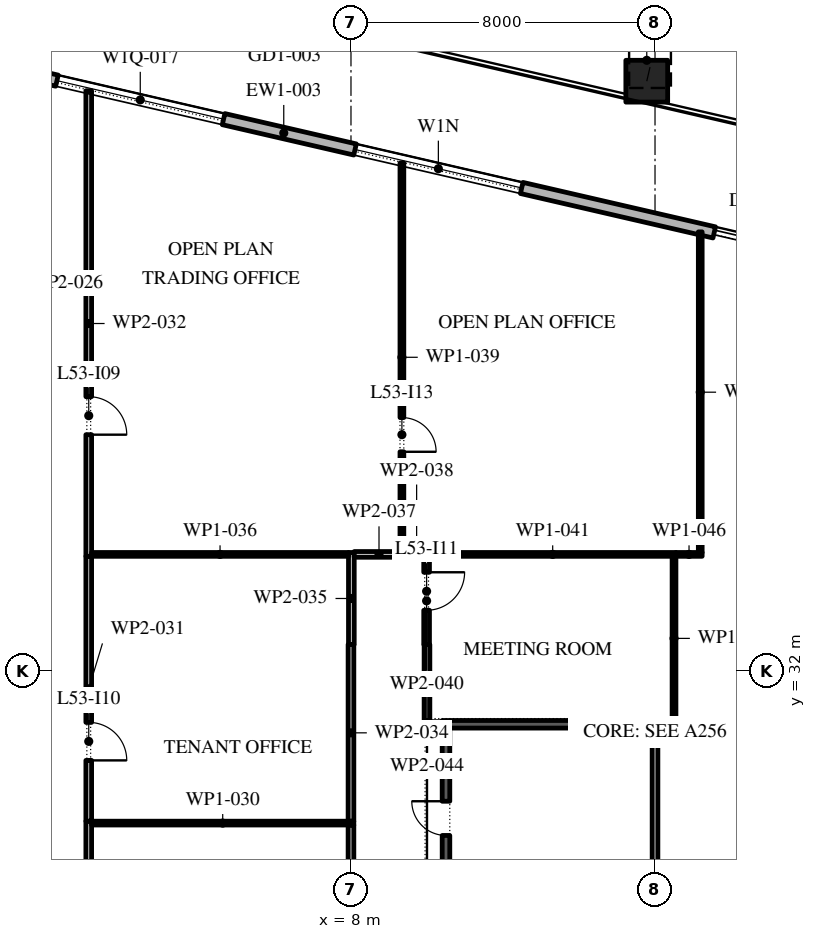
"""IFC4 building model, lengths in metres.
Left out: names, types, materials, properties, quantities, classifications, styles, units other than length and angle.
Written with IfcOpenShell. Run it as: python <this file> out.ifc"""

import sys

from ifc_helpers import new_model, si_unit, direction, frame, frame_2d, origin, origin_2d, place, context, subcontext, project, spatial, rectangle, extrude, element, fill, save


model = new_model("IFC4")
c1 = context("Model", 3, precision=1e-05, world=origin(), true_north=direction((0.0, 1.0)))
c2 = subcontext(c1, "Body", "Model", "MODEL_VIEW")
j1 = project(units=[si_unit("LENGTHUNIT", "METRE"), si_unit("PLANEANGLEUNIT", "RADIAN")], contexts=[c1])
p1 = place(None, origin())
s1 = spatial("IfcSite", under=j1, at=p1, CompositionType="ELEMENT")
p2 = place(p1, origin())
s2 = spatial("IfcBuilding", under=s1, at=p2, CompositionType="ELEMENT")
p3 = place(p2, frame((0.0, 0.0, 247.2)))
s3 = spatial("IfcBuildingStorey", under=s2, at=p3, CompositionType="ELEMENT", Elevation=247.2)
p4 = place(p3, frame((15.783, 47.521, 0.0), z_axis=(0.020377493232, 0.0882252832, 0.995892091129), x_axis=(-0.97434807649, 0.225046274885, 0.0)))
e1 = element("IfcColumn", 1, at=p4, inside=s3, PredefinedType="COLUMN", context=c2, shape_type="SweptSolid", body=[
    extrude(rectangle(XDim=1.1, YDim=1.1, at=origin_2d()), origin(), (0.0, 0.0, 1.0), 4.217),
])
p5 = place(p3, frame((29.616, 40.758, 0.0), z_axis=(0.0, 0.0, 1.0), x_axis=(-0.974370532314, 0.224949029246, 0.0)))
e2 = element("IfcWall", 2, at=p5, inside=s3, PredefinedType="STANDARD", context=c2, shape_type="SweptSolid", body=[
    extrude(rectangle(XDim=48.0, YDim=0.3, at=frame_2d((24.0, 0.0))), origin(), (0.0, 0.0, 1.0), 4.0),
])
p6 = place(p5, frame((1.625, 0.0, 0.45)))
e3 = element("IfcOpeningElement", 3, at=p6, cuts=e2, PredefinedType="OPENING", context=c2, shape_type="SweptSolid", body=[
    extrude(rectangle(XDim=4.5, YDim=2.675, at=frame_2d((2.25, 1.337))), frame((0.0, 0.16, 0.0), z_axis=(0.0, -1.0, 0.0), x_axis=(1.0, 0.0, 0.0)), (0.0, 0.0, 1.0), 0.32),
])
p7 = place(p5, frame((9.975, 0.0, 0.0)))
e4 = element("IfcOpeningElement", 4, at=p7, cuts=e2, PredefinedType="OPENING", context=c2, shape_type="SweptSolid", body=[
    extrude(rectangle(XDim=2.4, YDim=3.5, at=frame_2d((1.2, 1.75))), frame((0.0, 0.16, 0.0), z_axis=(0.0, -1.0, 0.0), x_axis=(1.0, 0.0, 0.0)), (0.0, 0.0, 1.0), 0.32),
])
p8 = place(p5, frame((17.575, 0.0, 0.45)))
e5 = element("IfcOpeningElement", 5, at=p8, cuts=e2, PredefinedType="OPENING", context=c2, shape_type="SweptSolid", body=[
    extrude(rectangle(XDim=4.5, YDim=2.525, at=frame_2d((2.25, 1.262))), frame((0.0, 0.16, 0.0), z_axis=(0.0, -1.0, 0.0), x_axis=(1.0, 0.0, 0.0)), (0.0, 0.0, 1.0), 0.32),
])
p9 = place(p5, frame((25.625, 0.0, 0.45)))
e6 = element("IfcOpeningElement", 6, at=p9, cuts=e2, PredefinedType="OPENING", context=c2, shape_type="SweptSolid", body=[
    extrude(rectangle(XDim=4.5, YDim=2.45, at=frame_2d((2.25, 1.225))), frame((0.0, 0.16, 0.0), z_axis=(0.0, -1.0, 0.0), x_axis=(1.0, 0.0, 0.0)), (0.0, 0.0, 1.0), 0.32),
])
p10 = place(p5, frame((33.675, 0.0, 0.45)))
e7 = element("IfcOpeningElement", 7, at=p10, cuts=e2, PredefinedType="OPENING", context=c2, shape_type="SweptSolid", body=[
    extrude(rectangle(XDim=4.5, YDim=2.45, at=frame_2d((2.25, 1.225))), frame((0.0, 0.16, 0.0), z_axis=(0.0, -1.0, 0.0), x_axis=(1.0, 0.0, 0.0)), (0.0, 0.0, 1.0), 0.32),
])
p11 = place(p5, frame((42.775, 0.0, 0.0)))
e8 = element("IfcOpeningElement", 8, at=p11, cuts=e2, PredefinedType="OPENING", context=c2, shape_type="SweptSolid", body=[
    extrude(rectangle(XDim=2.4, YDim=3.5, at=frame_2d((1.2, 1.75))), frame((0.0, 0.16, 0.0), z_axis=(0.0, -1.0, 0.0), x_axis=(1.0, 0.0, 0.0)), (0.0, 0.0, 1.0), 0.32),
])
p12 = place(p3, frame((10.5, 25.75, 0.0), z_axis=(0.0, 0.0, 1.0), x_axis=(0.0, 1.0, 0.0)))
e9 = element("IfcWall", 9, at=p12, inside=s3, PredefinedType="SHEAR", context=c2, shape_type="SweptSolid", body=[
    extrude(rectangle(XDim=4.75, YDim=0.2, at=frame_2d((2.375, 0.0))), origin(), (0.0, 0.0, 1.0), 4.0),
])
p13 = place(p12, frame((1.925, 0.0, 0.0)))
e10 = element("IfcOpeningElement", 10, at=p13, cuts=e9, PredefinedType="OPENING", context=c2, shape_type="SweptSolid", body=[
    extrude(rectangle(XDim=0.9, YDim=2.1, at=frame_2d((0.45, 1.05))), frame((0.0, 0.11, 0.0), z_axis=(0.0, -1.0, 0.0), x_axis=(1.0, 0.0, 0.0)), (0.0, 0.0, 1.0), 0.22),
])
p14 = place(p3, frame((10.4, 30.6, 0.0), z_axis=(0.0, 0.0, 1.0), x_axis=(1.0, 0.0, 0.0)))
e11 = element("IfcWall", 11, at=p14, inside=s3, PredefinedType="SHEAR", context=c2, shape_type="SweptSolid", body=[
    extrude(rectangle(XDim=11.2, YDim=0.2, at=frame_2d((5.6, 0.0))), origin(), (0.0, 0.0, 1.0), 4.0),
])
p15 = place(p3, frame((16.0, 25.75, 0.0), z_axis=(0.0, 0.0, 1.0), x_axis=(0.0, 1.0, 0.0)))
e12 = element("IfcWall", 12, at=p15, inside=s3, PredefinedType="PARTITIONING", context=c2, shape_type="SweptSolid", body=[
    extrude(rectangle(XDim=4.75, YDim=0.15, at=frame_2d((2.375, 0.0))), origin(), (0.0, 0.0, 1.0), 4.0),
])
p16 = place(p3, frame((1.1, 28.05, 0.0), z_axis=(0.0, 0.0, 1.0), x_axis=(0.0, -1.0, 0.0)))
e13 = element("IfcWall", 13, at=p16, inside=s3, PredefinedType="PARTITIONING", context=c2, shape_type="SweptSolid", body=[
    extrude(rectangle(XDim=8.975, YDim=0.15, at=frame_2d((4.488, 0.0))), origin(), (0.0, 0.0, 1.0), 4.0),
])
p17 = place(p3, frame((1.175, 28.0, 0.0), z_axis=(0.0, 0.0, 1.0), x_axis=(1.0, 0.0, 0.0)))
e14 = element("IfcWall", 14, at=p17, inside=s3, PredefinedType="PARTITIONING", context=c2, shape_type="SweptSolid", body=[
    extrude(rectangle(XDim=6.9, YDim=0.1, at=frame_2d((3.45, 0.0))), origin(), (0.0, 0.0, 1.0), 4.0),
])
p18 = place(p3, frame((1.1, 35.02, 0.0), z_axis=(0.0, 0.0, 1.0), x_axis=(0.0, -1.0, 0.0)))
e15 = element("IfcWall", 15, at=p18, inside=s3, PredefinedType="PARTITIONING", context=c2, shape_type="SweptSolid", body=[
    extrude(rectangle(XDim=6.97, YDim=0.15, at=frame_2d((3.485, 0.0))), origin(), (0.0, 0.0, 1.0), 4.0),
])
p19 = place(p18, frame((4.37, 0.0, 0.0)))
e16 = element("IfcOpeningElement", 16, at=p19, cuts=e15, PredefinedType="OPENING", context=c2, shape_type="SweptSolid", body=[
    extrude(rectangle(XDim=1.0, YDim=2.1, at=frame_2d((0.5, 1.05))), frame((0.0, 0.085, 0.0), z_axis=(0.0, -1.0, 0.0), x_axis=(1.0, 0.0, 0.0)), (0.0, 0.0, 1.0), 0.17),
])
p20 = place(p3, frame((1.1, 47.27, 0.0), z_axis=(0.0, 0.0, 1.0), x_axis=(0.0, -1.0, 0.0)))
e17 = element("IfcWall", 17, at=p20, inside=s3, PredefinedType="PARTITIONING", context=c2, shape_type="SweptSolid", body=[
    extrude(rectangle(XDim=12.25, YDim=0.15, at=frame_2d((6.125, 0.0))), origin(), (0.0, 0.0, 1.0), 4.0),
])
p21 = place(p20, frame((8.05, 0.0, 0.0)))
e18 = element("IfcOpeningElement", 18, at=p21, cuts=e17, PredefinedType="OPENING", context=c2, shape_type="SweptSolid", body=[
    extrude(rectangle(XDim=1.0, YDim=2.1, at=frame_2d((0.5, 1.05))), frame((0.0, 0.085, 0.0), z_axis=(0.0, -1.0, 0.0), x_axis=(1.0, 0.0, 0.0)), (0.0, 0.0, 1.0), 0.17),
])
p22 = place(p3, frame((8.0, 19.075, 0.0), z_axis=(0.0, 0.0, 1.0), x_axis=(0.0, 1.0, 0.0)))
e19 = element("IfcWall", 19, at=p22, inside=s3, PredefinedType="PARTITIONING", context=c2, shape_type="SweptSolid", body=[
    extrude(rectangle(XDim=8.875, YDim=0.15, at=frame_2d((4.438, 0.0))), origin(), (0.0, 0.0, 1.0), 4.0),
])
p23 = place(p22, frame((4.775, 0.0, 0.0)))
e20 = element("IfcOpeningElement", 20, at=p23, cuts=e19, PredefinedType="OPENING", context=c2, shape_type="SweptSolid", body=[
    extrude(rectangle(XDim=1.0, YDim=2.1, at=frame_2d((0.5, 1.05))), frame((0.0, 0.085, 0.0), z_axis=(0.0, -1.0, 0.0), x_axis=(1.0, 0.0, 0.0)), (0.0, 0.0, 1.0), 0.17),
])
p24 = place(p3, frame((8.0, 28.05, 0.0), z_axis=(0.0, 0.0, 1.0), x_axis=(0.0, 1.0, 0.0)))
e21 = element("IfcWall", 21, at=p24, inside=s3, PredefinedType="PARTITIONING", context=c2, shape_type="SweptSolid", body=[
    extrude(rectangle(XDim=4.65, YDim=0.15, at=frame_2d((2.325, 0.0))), origin(), (0.0, 0.0, 1.0), 4.0),
])
p25 = place(p3, frame((8.01, 32.7, 0.0), z_axis=(0.0, 0.0, 1.0), x_axis=(0.0, 1.0, 0.0)))
e22 = element("IfcWall", 22, at=p25, inside=s3, PredefinedType="PARTITIONING", context=c2, shape_type="SweptSolid", body=[
    extrude(rectangle(XDim=2.42, YDim=0.15, at=frame_2d((1.21, 0.0))), origin(), (0.0, 0.0, 1.0), 4.0),
])
p26 = place(p3, frame((7.935, 35.07, 0.0), z_axis=(0.0, 0.0, 1.0), x_axis=(-1.0, 0.0, 0.0)))
e23 = element("IfcWall", 23, at=p26, inside=s3, PredefinedType="PARTITIONING", context=c2, shape_type="SweptSolid", body=[
    extrude(rectangle(XDim=6.76, YDim=0.1, at=frame_2d((3.38, 0.0))), origin(), (0.0, 0.0, 1.0), 4.0),
])
p27 = place(p3, frame((8.085, 35.07, 0.0), z_axis=(0.0, 0.0, 1.0), x_axis=(1.0, 0.0, 0.0)))
e24 = element("IfcWall", 24, at=p27, inside=s3, PredefinedType="PARTITIONING", context=c2, shape_type="SweptSolid", body=[
    extrude(rectangle(XDim=1.305, YDim=0.15, at=frame_2d((0.652, 0.0))), origin(), (0.0, 0.0, 1.0), 4.0),
])
p28 = place(p3, frame((9.39, 35.07, 0.0), z_axis=(0.0, 0.0, 1.0), x_axis=(1.0, 0.0, 0.0)))
e25 = element("IfcWall", 25, at=p28, inside=s3, PredefinedType="PARTITIONING", context=c2, shape_type="SweptSolid", body=[
    extrude(rectangle(XDim=0.675, YDim=0.15, at=frame_2d((0.337, 0.0))), origin(), (0.0, 0.0, 1.0), 4.0),
])
p29 = place(p3, frame((9.34, 45.368, 0.0), z_axis=(0.0, 0.0, 1.0), x_axis=(0.0, -1.0, 0.0)))
e26 = element("IfcWall", 26, at=p29, inside=s3, PredefinedType="PARTITIONING", context=c2, shape_type="SweptSolid", body=[
    extrude(rectangle(XDim=10.223, YDim=0.1, at=frame_2d((5.111, 0.0))), origin(), (0.0, 0.0, 1.0), 4.0),
])
p30 = place(p29, frame((6.698, 0.0, 0.0)))
e27 = element("IfcOpeningElement", 27, at=p30, cuts=e26, PredefinedType="OPENING", context=c2, shape_type="SweptSolid", body=[
    extrude(rectangle(XDim=0.9, YDim=2.1, at=frame_2d((0.45, 1.05))), frame((0.0, 0.06, 0.0), z_axis=(0.0, -1.0, 0.0), x_axis=(1.0, 0.0, 0.0)), (0.0, 0.0, 1.0), 0.12),
])
p31 = place(p3, frame((9.99, 34.995, 0.0), z_axis=(0.0, 0.0, 1.0), x_axis=(0.0, -1.0, 0.0)))
e28 = element("IfcWall", 28, at=p31, inside=s3, PredefinedType="PARTITIONING", context=c2, shape_type="SweptSolid", body=[
    extrude(rectangle(XDim=2.295, YDim=0.15, at=frame_2d((1.147, 0.0))), origin(), (0.0, 0.0, 1.0), 4.0),
])
p32 = place(p31, frame((0.395, 0.0, 0.0)))
e29 = element("IfcOpeningElement", 29, at=p32, cuts=e28, PredefinedType="OPENING", context=c2, shape_type="SweptSolid", body=[
    extrude(rectangle(XDim=1.0, YDim=2.1, at=frame_2d((0.5, 1.05))), frame((0.0, 0.085, 0.0), z_axis=(0.0, -1.0, 0.0), x_axis=(1.0, 0.0, 0.0)), (0.0, 0.0, 1.0), 0.17),
])
p33 = place(p3, frame((10.065, 35.07, 0.0), z_axis=(0.0, 0.0, 1.0), x_axis=(1.0, 0.0, 0.0)))
e30 = element("IfcWall", 30, at=p33, inside=s3, PredefinedType="PARTITIONING", context=c2, shape_type="SweptSolid", body=[
    extrude(rectangle(XDim=6.485, YDim=0.1, at=frame_2d((3.243, 0.0))), origin(), (0.0, 0.0, 1.0), 4.0),
])
p34 = place(p3, frame((10.0, 32.7, 0.0), z_axis=(0.0, 0.0, 1.0), x_axis=(0.0, -1.0, 0.0)))
e31 = element("IfcWall", 31, at=p34, inside=s3, PredefinedType="PARTITIONING", context=c2, shape_type="SweptSolid", body=[
    extrude(rectangle(XDim=2.0, YDim=0.15, at=frame_2d((1.0, 0.0))), origin(), (0.0, 0.0, 1.0), 4.0),
])
p35 = place(p3, frame((16.5, 35.02, 0.0), z_axis=(0.0, 0.0, 1.0), x_axis=(0.0, -1.0, 0.0)))
e32 = element("IfcWall", 32, at=p35, inside=s3, PredefinedType="PARTITIONING", context=c2, shape_type="SweptSolid", body=[
    extrude(rectangle(XDim=4.32, YDim=0.1, at=frame_2d((2.16, 0.0))), origin(), (0.0, 0.0, 1.0), 4.0),
])
p36 = place(p3, frame((17.24, 35.07, 0.0), z_axis=(0.0, 0.0, 1.0), x_axis=(-1.0, 0.0, 0.0)))
e33 = element("IfcWall", 33, at=p36, inside=s3, PredefinedType="PARTITIONING", context=c2, shape_type="SweptSolid", body=[
    extrude(rectangle(XDim=0.69, YDim=0.1, at=frame_2d((0.345, 0.0))), origin(), (0.0, 0.0, 1.0), 4.0),
])
p37 = place(p3, frame((17.19, 43.556, 0.0), z_axis=(0.0, 0.0, 1.0), x_axis=(0.0, -1.0, 0.0)))
e34 = element("IfcWall", 34, at=p37, inside=s3, PredefinedType="PARTITIONING", context=c2, shape_type="SweptSolid", body=[
    extrude(rectangle(XDim=8.436, YDim=0.1, at=frame_2d((4.218, 0.0))), origin(), (0.0, 0.0, 1.0), 4.0),
])
p38 = place(p7, origin())
e35 = element("IfcDoor", 35, at=p38, inside=s3, OperationType="DOUBLE_DOOR_SLIDING", PredefinedType="DOOR", context=c2, shape_type="SweptSolid", body=[
    extrude(rectangle(XDim=2.4, YDim=3.5, at=frame_2d((1.2, 1.75))), frame((0.0, 0.025, 0.0), z_axis=(0.0, -1.0, 0.0), x_axis=(1.0, 0.0, 0.0)), (0.0, 0.0, 1.0), 0.05),
])
fill(e4, e35)
p39 = place(p8, origin())
e36 = element("IfcWindow", 36, at=p39, inside=s3, PartitioningType="DOUBLE_PANEL_VERTICAL", PredefinedType="WINDOW", context=c2, shape_type="SweptSolid", body=[
    extrude(rectangle(XDim=4.5, YDim=2.525, at=frame_2d((2.25, 1.262))), frame((0.0, 0.03, 0.0), z_axis=(0.0, -1.0, 0.0), x_axis=(1.0, 0.0, 0.0)), (0.0, 0.0, 1.0), 0.06),
])
fill(e5, e36)
p40 = place(p9, origin())
e37 = element("IfcWindow", 37, at=p40, inside=s3, PartitioningType="DOUBLE_PANEL_VERTICAL", PredefinedType="WINDOW", context=c2, shape_type="SweptSolid", body=[
    extrude(rectangle(XDim=4.5, YDim=2.45, at=frame_2d((2.25, 1.225))), frame((0.0, 0.03, 0.0), z_axis=(0.0, -1.0, 0.0), x_axis=(1.0, 0.0, 0.0)), (0.0, 0.0, 1.0), 0.06),
])
fill(e6, e37)
p41 = place(p13, origin())
e38 = element("IfcDoor", 38, at=p41, inside=s3, OperationType="SINGLE_SWING_LEFT", PredefinedType="DOOR", context=c2, shape_type="SweptSolid", body=[
    extrude(rectangle(XDim=0.9, YDim=2.1, at=frame_2d((0.45, 1.05))), frame((0.0, -0.05, 0.0), z_axis=(0.0, -1.0, 0.0), x_axis=(1.0, 0.0, 0.0)), (0.0, 0.0, 1.0), 0.05),
])
fill(e10, e38)
p42 = place(p21, origin())
e39 = element("IfcDoor", 39, at=p42, inside=s3, OperationType="SINGLE_SWING_LEFT", PredefinedType="DOOR", context=c2, shape_type="SweptSolid", body=[
    extrude(rectangle(XDim=1.0, YDim=2.1, at=frame_2d((0.5, 1.05))), frame((0.0, 0.025, 0.0), z_axis=(0.0, -1.0, 0.0), x_axis=(1.0, 0.0, 0.0)), (0.0, 0.0, 1.0), 0.05),
])
fill(e18, e39)
p43 = place(p19, origin())
e40 = element("IfcDoor", 40, at=p43, inside=s3, OperationType="SINGLE_SWING_LEFT", PredefinedType="DOOR", context=c2, shape_type="SweptSolid", body=[
    extrude(rectangle(XDim=1.0, YDim=2.1, at=frame_2d((0.5, 1.05))), frame((0.0, 0.025, 0.0), z_axis=(0.0, -1.0, 0.0), x_axis=(1.0, 0.0, 0.0)), (0.0, 0.0, 1.0), 0.05),
])
fill(e16, e40)
p44 = place(p32, origin())
e41 = element("IfcDoor", 41, at=p44, inside=s3, OperationType="SINGLE_SWING_RIGHT", PredefinedType="DOOR", context=c2, shape_type="SweptSolid", body=[
    extrude(rectangle(XDim=1.0, YDim=2.1, at=frame_2d((0.5, 1.05))), frame((0.0, 0.025, 0.0), z_axis=(0.0, -1.0, 0.0), x_axis=(1.0, 0.0, 0.0)), (0.0, 0.0, 1.0), 0.05),
])
fill(e29, e41)
p45 = place(p30, origin())
e42 = element("IfcDoor", 42, at=p45, inside=s3, OperationType="SINGLE_SWING_LEFT", PredefinedType="DOOR", context=c2, shape_type="SweptSolid", body=[
    extrude(rectangle(XDim=0.9, YDim=2.1, at=frame_2d((0.45, 1.05))), frame((0.0, 0.025, 0.0), z_axis=(0.0, -1.0, 0.0), x_axis=(1.0, 0.0, 0.0)), (0.0, 0.0, 1.0), 0.05),
])
fill(e27, e42)
save(model, sys.argv[1])
